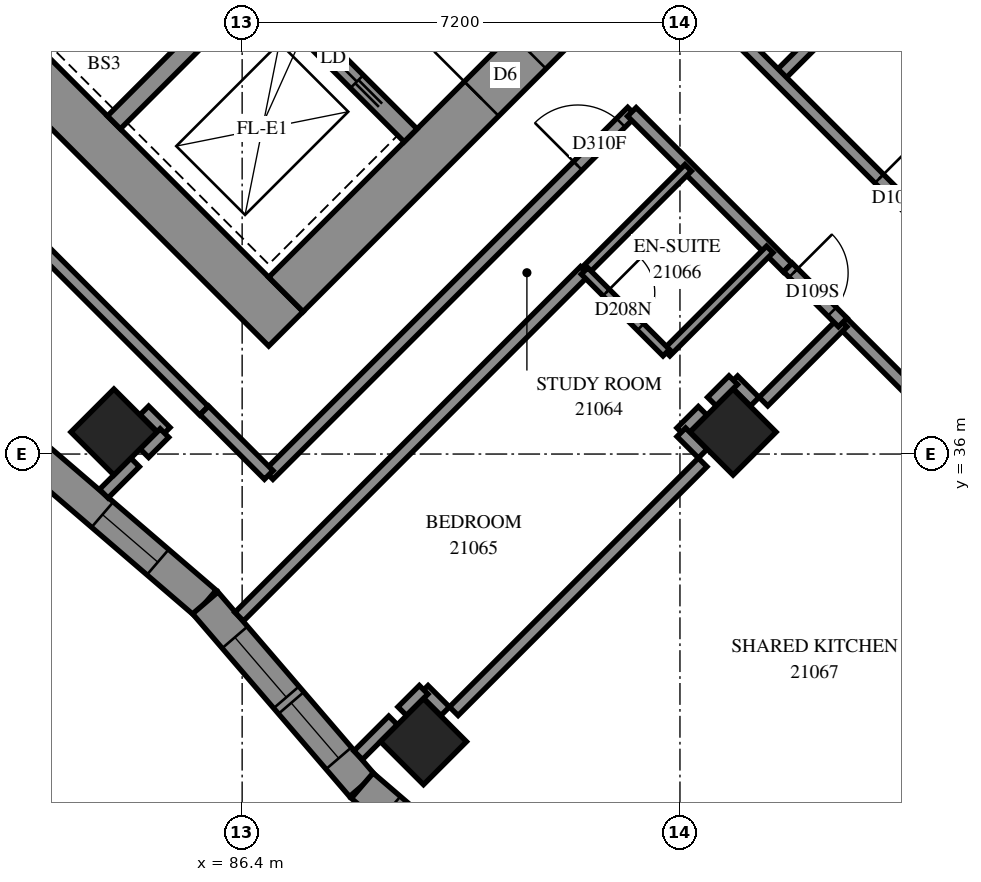
"""IFC4 building model, lengths in metres.
Left out: names, types, materials, properties, quantities, classifications, styles, units other than length and angle.
Written with IfcOpenShell. Run it as: python <this file> out.ifc"""

import sys

from ifc_helpers import new_model, si_unit, direction, frame, frame_2d, origin, origin_2d, place, context, subcontext, project, spatial, polyline, rectangle, outline, extrude, element, fill, save


model = new_model("IFC4")
c1 = context("Model", 3, precision=1e-05, world=origin(), true_north=direction((0.0, 1.0)))
c2 = subcontext(c1, "Body", "Model", "MODEL_VIEW")
j1 = project(units=[si_unit("LENGTHUNIT", "METRE"), si_unit("PLANEANGLEUNIT", "RADIAN")], contexts=[c1])
p1 = place(None, origin())
s1 = spatial("IfcSite", under=j1, at=p1, CompositionType="ELEMENT")
p2 = place(p1, origin())
s2 = spatial("IfcBuilding", under=s1, at=p2, CompositionType="ELEMENT")
p3 = place(p2, frame((0.0, 0.0, 81.2)))
s3 = spatial("IfcBuildingStorey", under=s2, at=p3, CompositionType="ELEMENT", Elevation=81.2)
for number, where, z_axis, x_axis in (
    (1, (84.291, 36.362, 0.0), (0.0, 0.0, 1.0), (0.707, -0.707, 0.0)),
    (2, (94.474, 36.362, 0.0), (0.0, 0.0, 1.0), (0.707, -0.707, 0.0)),
    (3, (89.382, 31.271, 0.0), (0.0, 0.0, 1.0), (0.707, -0.707, 0.0)),
):
    element("IfcColumn", number, at=place(p3, frame(where, z_axis=z_axis, x_axis=x_axis)), inside=s3, PredefinedType="COLUMN", context=c2, shape_type="SweptSolid", body=[
        extrude(rectangle(XDim=1.0, YDim=1.0, at=origin_2d()), origin(), (0.0, 0.0, 1.0), 3.1),
    ])
p4 = place(p3, frame((75.806, 49.373, -0.3), z_axis=(0.0, 0.0, 1.0), x_axis=(0.7071067812, -0.7071067812, 0.0)))
e4 = element("IfcWall", 4, at=p4, inside=s3, PredefinedType="SHEAR", context=c2, shape_type="SweptSolid", body=[
    extrude(rectangle(XDim=16.0, YDim=0.8, at=frame_2d((8.0, 0.0))), origin(), (0.0, 0.0, 1.0), 2.7),
])
p5 = place(p3, frame((87.12, 38.625, -0.3), z_axis=(0.0, 0.0, 1.0), x_axis=(0.7071067812, 0.7071067812, 0.0)))
e5 = element("IfcWall", 5, at=p5, inside=s3, PredefinedType="SHEAR", context=c2, shape_type="SweptSolid", body=[
    extrude(rectangle(XDim=14.4, YDim=0.8, at=frame_2d((7.2, 0.0))), origin(), (0.0, 0.0, 1.0), 2.7),
])
p6 = place(p5, frame((4.55, 0.0, 0.3)))
e6 = element("IfcOpeningElement", 6, at=p6, cuts=e5, PredefinedType="OPENING", context=c2, shape_type="SweptSolid", body=[
    extrude(rectangle(XDim=1.1, YDim=2.1, at=frame_2d((0.55, 1.05))), frame((0.0, 0.41, 0.0), z_axis=(0.0, -1.0, 0.0), x_axis=(1.0, 0.0, 0.0)), (0.0, 0.0, 1.0), 0.82),
])
p7 = place(p5, frame((11.35, 0.0, 0.3)))
e7 = element("IfcOpeningElement", 7, at=p7, cuts=e5, PredefinedType="OPENING", context=c2, shape_type="SweptSolid", body=[
    extrude(rectangle(XDim=1.1, YDim=2.1, at=frame_2d((0.55, 1.05))), frame((0.0, 0.41, 0.0), z_axis=(0.0, -1.0, 0.0), x_axis=(1.0, 0.0, 0.0)), (0.0, 0.0, 1.0), 0.82),
])
p8 = place(p3, frame((84.291, 41.453, 0.0), z_axis=(0.0, 0.0, 1.0), x_axis=(0.7071067812, 0.7071067812, 0.0)))
e8 = element("IfcWall", 8, at=p8, inside=s3, PredefinedType="SOLIDWALL", context=c2, shape_type="SweptSolid", body=[
    extrude(rectangle(XDim=3.3, YDim=0.3, at=frame_2d((1.65, 0.0))), origin(), (0.0, 0.0, 1.0), 3.1),
])
p9 = place(p3, frame((78.988, 51.423, 0.0), z_axis=(0.0, 0.0, 1.0), x_axis=(0.7071067812, -0.7071067812, 0.0)))
e9 = element("IfcWall", 9, at=p9, inside=s3, PredefinedType="SOLIDWALL", context=c2, shape_type="SweptSolid", body=[
    extrude(rectangle(XDim=14.4, YDim=0.3, at=frame_2d((7.2, 0.0))), origin(), (0.0, 0.0, 1.0), 3.1),
])
p10 = place(p9, frame((1.25, 0.0, 0.0)))
e10 = element("IfcOpeningElement", 10, at=p10, cuts=e9, PredefinedType="OPENING", context=c2, shape_type="SweptSolid", body=[
    extrude(rectangle(XDim=1.1, YDim=2.1, at=frame_2d((0.55, 1.05))), frame((0.0, 0.16, 0.0), z_axis=(0.0, -1.0, 0.0), x_axis=(1.0, 0.0, 0.0)), (0.0, 0.0, 1.0), 0.32),
])
p11 = place(p9, frame((4.85, 0.0, 0.0)))
e11 = element("IfcOpeningElement", 11, at=p11, cuts=e9, PredefinedType="OPENING", context=c2, shape_type="SweptSolid", body=[
    extrude(rectangle(XDim=1.1, YDim=2.1, at=frame_2d((0.55, 1.05))), frame((0.0, 0.16, 0.0), z_axis=(0.0, -1.0, 0.0), x_axis=(1.0, 0.0, 0.0)), (0.0, 0.0, 1.0), 0.32),
])
p12 = place(p9, frame((8.45, 0.0, 0.0)))
e12 = element("IfcOpeningElement", 12, at=p12, cuts=e9, PredefinedType="OPENING", context=c2, shape_type="SweptSolid", body=[
    extrude(rectangle(XDim=1.1, YDim=2.1, at=frame_2d((0.55, 1.05))), frame((0.0, 0.16, 0.0), z_axis=(0.0, -1.0, 0.0), x_axis=(1.0, 0.0, 0.0)), (0.0, 0.0, 1.0), 0.32),
])
p13 = place(p9, frame((12.05, 0.0, 0.0)))
e13 = element("IfcOpeningElement", 13, at=p13, cuts=e9, PredefinedType="OPENING", context=c2, shape_type="SweptSolid", body=[
    extrude(rectangle(XDim=1.1, YDim=2.1, at=frame_2d((0.55, 1.05))), frame((0.0, 0.16, 0.0), z_axis=(0.0, -1.0, 0.0), x_axis=(1.0, 0.0, 0.0)), (0.0, 0.0, 1.0), 0.32),
])
p14 = place(p3, frame((82.789, 36.133, 0.0), z_axis=(0.0, 0.0, 1.0), x_axis=(0.7586290345, -0.6515228223, 0.0)))
e14 = element("IfcWall", 14, at=p14, inside=s3, PredefinedType="SOLIDWALL", context=c2, shape_type="SweptSolid", body=[
    extrude(outline(polyline([(-0.021, -0.275), (3.941, -0.275), (3.982, 0.275), (0.021, 0.275), (-0.021, -0.275)])), origin(), (0.0, 0.0, 1.0), 3.1),
])
p15 = place(p14, frame((1.732, 0.0, 0.5)))
e15 = element("IfcOpeningElement", 15, at=p15, cuts=e14, PredefinedType="OPENING", context=c2, shape_type="SweptSolid", body=[
    extrude(rectangle(XDim=1.2, YDim=2.45, at=frame_2d((0.6, 1.225))), frame((0.0, 0.285, 0.0), z_axis=(0.0, -1.0, 0.0), x_axis=(1.0, 0.0, 0.0)), (0.0, 0.0, 1.0), 0.57),
])
p16 = place(p3, frame((85.794, 33.552, 0.0), z_axis=(0.0, 0.0, 1.0), x_axis=(0.6515228223, -0.7586290345, 0.0)))
e16 = element("IfcWall", 16, at=p16, inside=s3, PredefinedType="SOLIDWALL", context=c2, shape_type="SweptSolid", body=[
    extrude(outline(polyline([(0.021, -0.275), (3.982, -0.275), (3.941, 0.275), (-0.021, 0.275), (0.021, -0.275)])), origin(), (0.0, 0.0, 1.0), 3.1),
])
p17 = place(p16, frame((0.746, 0.0, 0.5)))
e17 = element("IfcOpeningElement", 17, at=p17, cuts=e16, PredefinedType="OPENING", context=c2, shape_type="SweptSolid", body=[
    extrude(rectangle(XDim=1.3, YDim=2.45, at=frame_2d((0.65, 1.225))), frame((0.0, 0.285, 0.0), z_axis=(0.0, -1.0, 0.0), x_axis=(1.0, 0.0, 0.0)), (0.0, 0.0, 1.0), 0.57),
])
p18 = place(p16, frame((2.168, 0.0, 0.5)))
e18 = element("IfcOpeningElement", 18, at=p18, cuts=e16, PredefinedType="OPENING", context=c2, shape_type="SweptSolid", body=[
    extrude(rectangle(XDim=1.2, YDim=2.45, at=frame_2d((0.6, 1.225))), frame((0.0, 0.285, 0.0), z_axis=(0.0, -1.0, 0.0), x_axis=(1.0, 0.0, 0.0)), (0.0, 0.0, 1.0), 0.57),
])
p19 = place(p3, frame((88.375, 30.547, 0.0), z_axis=(0.0, 0.0, 1.0), x_axis=(0.7586290345, -0.6515228223, 0.0)))
e19 = element("IfcWall", 19, at=p19, inside=s3, PredefinedType="SOLIDWALL", context=c2, shape_type="SweptSolid", body=[
    extrude(outline(polyline([(-0.021, -0.275), (3.941, -0.275), (3.982, 0.275), (0.021, 0.275), (-0.021, -0.275)])), origin(), (0.0, 0.0, 1.0), 3.1),
])
p20 = place(p19, frame((0.591, 0.0, 0.5)))
e20 = element("IfcOpeningElement", 20, at=p20, cuts=e19, PredefinedType="OPENING", context=c2, shape_type="SweptSolid", body=[
    extrude(rectangle(XDim=1.3, YDim=2.45, at=frame_2d((0.65, 1.225))), frame((0.0, 0.285, 0.0), z_axis=(0.0, -1.0, 0.0), x_axis=(1.0, 0.0, 0.0)), (0.0, 0.0, 1.0), 0.57),
])
p21 = place(p19, frame((2.091, 0.0, 0.5)))
e21 = element("IfcOpeningElement", 21, at=p21, cuts=e19, PredefinedType="OPENING", context=c2, shape_type="SweptSolid", body=[
    extrude(rectangle(XDim=1.3, YDim=2.45, at=frame_2d((0.65, 1.225))), frame((0.0, 0.285, 0.0), z_axis=(0.0, -1.0, 0.0), x_axis=(1.0, 0.0, 0.0)), (0.0, 0.0, 1.0), 0.57),
])
p22 = place(p3, frame((95.215, 42.197, 0.0), z_axis=(0.0, 0.0, 1.0), x_axis=(0.7071114855, 0.7071020769, 0.0)))
e22 = element("IfcWall", 22, at=p22, inside=s3, PredefinedType="PARTITIONING", context=c2, shape_type="SweptSolid", body=[
    extrude(rectangle(XDim=10.629, YDim=0.2, at=frame_2d((5.314, 0.0))), origin(), (0.0, 0.0, 1.0), 3.1),
])
p23 = place(p3, frame((94.294, 43.111, 0.0), z_axis=(0.0, 0.0, 1.0), x_axis=(0.7071067812, -0.7071067812, 0.0)))
e23 = element("IfcWall", 23, at=p23, inside=s3, PredefinedType="PARTITIONING", context=c2, shape_type="SweptSolid", body=[
    extrude(rectangle(XDim=8.499, YDim=0.2, at=frame_2d((4.25, 0.0))), origin(), (0.0, 0.0, 1.0), 3.1),
])
p24 = place(p23, frame((3.651, 0.0, 0.0)))
e24 = element("IfcOpeningElement", 24, at=p24, cuts=e23, PredefinedType="OPENING", context=c2, shape_type="SweptSolid", body=[
    extrude(rectangle(XDim=0.9, YDim=2.1, at=frame_2d((0.45, 1.05))), frame((0.0, 0.11, 0.0), z_axis=(0.0, -1.0, 0.0), x_axis=(1.0, 0.0, 0.0)), (0.0, 0.0, 1.0), 0.22),
])
p25 = place(p3, frame((86.835, 35.655, 0.0), z_axis=(0.0, 0.0, 1.0), x_axis=(0.7071067812, 0.7071067812, 0.0)))
e25 = element("IfcWall", 25, at=p25, inside=s3, PredefinedType="PARTITIONING", context=c2, shape_type="SweptSolid", body=[
    extrude(rectangle(XDim=8.451, YDim=0.2, at=frame_2d((4.226, 0.0))), origin(), (0.0, 0.0, 1.0), 3.1),
])
p26 = place(p25, frame((7.192, 0.0, 0.0)))
e26 = element("IfcOpeningElement", 26, at=p26, cuts=e25, PredefinedType="OPENING", context=c2, shape_type="SweptSolid", body=[
    extrude(rectangle(XDim=1.0, YDim=2.1, at=frame_2d((0.5, 1.05))), frame((0.0, 0.11, 0.0), z_axis=(0.0, -1.0, 0.0), x_axis=(1.0, 0.0, 0.0)), (0.0, 0.0, 1.0), 0.22),
])
p27 = place(p3, frame((86.351, 33.325, 0.0), z_axis=(0.0, 0.0, 1.0), x_axis=(0.7069824066, 0.7072311339, 0.0)))
e27 = element("IfcWall", 27, at=p27, inside=s3, PredefinedType="PARTITIONING", context=c2, shape_type="SweptSolid", body=[
    extrude(rectangle(XDim=8.041, YDim=0.2, at=frame_2d((4.021, 0.0))), origin(), (0.0, 0.0, 1.0), 3.1),
])
p28 = place(p3, frame((80.948, 41.536, 0.0), z_axis=(0.0, 0.0, 1.0), x_axis=(0.7071067812, -0.7071067812, 0.0)))
e28 = element("IfcWall", 28, at=p28, inside=s3, PredefinedType="PARTITIONING", context=c2, shape_type="SweptSolid", body=[
    extrude(rectangle(XDim=6.822, YDim=0.2, at=frame_2d((3.411, 0.0))), origin(), (0.0, 0.0, 1.0), 3.1),
])
p29 = place(p3, frame((89.881, 31.771, 0.0), z_axis=(0.0, 0.0, 1.0), x_axis=(0.7071067812, 0.7071067812, 0.0)))
e29 = element("IfcWall", 29, at=p29, inside=s3, PredefinedType="PARTITIONING", context=c2, shape_type="SweptSolid", body=[
    extrude(rectangle(XDim=5.787, YDim=0.2, at=frame_2d((2.893, 0.0))), origin(), (0.0, 0.0, 1.0), 3.1),
])
p30 = place(p3, frame((94.973, 26.681, 0.0), z_axis=(0.0, 0.0, 1.0), x_axis=(0.7071067812, 0.7071067812, 0.0)))
e30 = element("IfcWall", 30, at=p30, inside=s3, PredefinedType="PARTITIONING", context=c2, shape_type="SweptSolid", body=[
    extrude(rectangle(XDim=5.784, YDim=0.2, at=frame_2d((2.892, 0.0))), origin(), (0.0, 0.0, 1.0), 3.1),
])
p31 = place(p3, frame((92.809, 41.627, 0.0), z_axis=(0.0, 0.0, 1.0), x_axis=(0.7071067812, -0.7071067812, 0.0)))
e31 = element("IfcWall", 31, at=p31, inside=s3, PredefinedType="PARTITIONING", context=c2, shape_type="SweptSolid", body=[
    extrude(rectangle(XDim=3.623, YDim=0.2, at=frame_2d((1.812, 0.0))), origin(), (0.0, 0.0, 1.0), 3.1),
])
p32 = place(p3, frame((96.274, 38.162, 0.0), z_axis=(0.0, 0.0, 1.0), x_axis=(0.7071067812, -0.7071067812, 0.0)))
e32 = element("IfcWall", 32, at=p32, inside=s3, PredefinedType="PARTITIONING", context=c2, shape_type="SweptSolid", body=[
    extrude(rectangle(XDim=3.1, YDim=0.2, at=frame_2d((1.55, 0.0))), origin(), (0.0, 0.0, 1.0), 3.1),
])
for number, where, z_axis, x_axis in (
    (33, (92.037, 39.011, 0.0), (0.0, 0.0, 1.0), (0.708, 0.707, 0.0)),
    (34, (93.381, 37.667, 0.0), (0.0, 0.0, 1.0), (0.707, 0.708, 0.0)),
):
    element("IfcWall", number, at=place(p3, frame(where, z_axis=z_axis, x_axis=x_axis)), inside=s3, PredefinedType="PARTITIONING", context=c2, shape_type="SweptSolid", body=[
        extrude(rectangle(XDim=2.4, YDim=0.15, at=frame_2d((1.2, 0.0))), origin(), (0.0, 0.0, 1.0), 3.1),
    ])
p33 = place(p3, frame((92.031, 39.011, 0.0), z_axis=(0.0, 0.0, 1.0), x_axis=(0.7071067812, -0.7071067812, 0.0)))
e35 = element("IfcWall", 35, at=p33, inside=s3, PredefinedType="PARTITIONING", context=c2, shape_type="SweptSolid", body=[
    extrude(rectangle(XDim=1.901, YDim=0.15, at=frame_2d((0.95, 0.0))), origin(), (0.0, 0.0, 1.0), 3.1),
])
p34 = place(p33, frame((0.502, 0.0, 0.0)))
e36 = element("IfcOpeningElement", 36, at=p34, cuts=e35, PredefinedType="OPENING", context=c2, shape_type="SweptSolid", body=[
    extrude(rectangle(XDim=0.8, YDim=2.1, at=frame_2d((0.4, 1.05))), frame((0.0, 0.085, 0.0), z_axis=(0.0, -1.0, 0.0), x_axis=(1.0, 0.0, 0.0)), (0.0, 0.0, 1.0), 0.17),
])
p35 = place(p3, frame((94.973, 36.863, 0.0), z_axis=(0.0, 0.0, 1.0), x_axis=(0.7071067812, 0.7071067812, 0.0)))
e37 = element("IfcWall", 37, at=p35, inside=s3, PredefinedType="PARTITIONING", context=c2, shape_type="SweptSolid", body=[
    extrude(rectangle(XDim=1.841, YDim=0.2, at=frame_2d((0.921, 0.0))), origin(), (0.0, 0.0, 1.0), 3.1),
])
p36 = place(p3, frame((85.778, 36.718, 0.0), z_axis=(0.0, 0.0, 1.0), x_axis=(0.7064400143, -0.70777292, 0.0)))
e38 = element("IfcWall", 38, at=p36, inside=s3, PredefinedType="PARTITIONING", context=c2, shape_type="SweptSolid", body=[
    extrude(rectangle(XDim=1.5, YDim=0.2, at=frame_2d((0.75, 0.0))), origin(), (0.0, 0.0, 1.0), 3.1),
])
p37 = place(p3, frame((95.375, 39.069, 0.0), z_axis=(0.0, 0.0, 1.0), x_axis=(0.7063232841, -0.7078894111, 0.0)))
e39 = element("IfcWall", 39, at=p37, inside=s3, PredefinedType="PARTITIONING", context=c2, shape_type="SweptSolid", body=[
    extrude(rectangle(XDim=1.277, YDim=0.2, at=frame_2d((0.638, 0.0))), origin(), (0.0, 0.0, 1.0), 3.1),
])
p38 = place(p37, frame((0.129, 0.0, 0.0)))
e40 = element("IfcOpeningElement", 40, at=p38, cuts=e39, PredefinedType="OPENING", context=c2, shape_type="SweptSolid", body=[
    extrude(rectangle(XDim=0.9, YDim=2.1, at=frame_2d((0.45, 1.05))), frame((0.0, 0.11, 0.0), z_axis=(0.0, -1.0, 0.0), x_axis=(1.0, 0.0, 0.0)), (0.0, 0.0, 1.0), 0.22),
])
p39 = place(p3, frame((88.308, 31.047, 0.0), z_axis=(0.0, 0.0, 1.0), x_axis=(0.7071684107, 0.7070451463, 0.0)))
e41 = element("IfcWall", 41, at=p39, inside=s3, PredefinedType="PARTITIONING", context=c2, shape_type="SweptSolid", body=[
    extrude(rectangle(XDim=0.811, YDim=0.2, at=frame_2d((0.406, 0.0))), origin(), (0.0, 0.0, 1.0), 3.1),
])
p40 = place(p3, frame((84.124, 35.348, 0.0), z_axis=(0.0, 0.0, 1.0), x_axis=(0.7071067812, 0.7071067812, 0.0)))
e42 = element("IfcWall", 42, at=p40, inside=s3, PredefinedType="PARTITIONING", context=c2, shape_type="SweptSolid", body=[
    extrude(rectangle(XDim=0.728, YDim=0.2, at=frame_2d((0.364, 0.0))), origin(), (0.0, 0.0, 1.0), 3.1),
])
for number, where, z_axis, x_axis in (
    (43, (84.792, 36.718, 0.0), (0.0, 0.0, 1.0), (0.707, -0.707, 0.0)),
    (44, (93.621, 36.359, 0.0), (0.0, 0.0, 1.0), (0.707, 0.707, 0.0)),
    (45, (89.387, 32.123, 0.0), (0.0, 0.0, 1.0), (0.707, -0.707, 0.0)),
):
    element("IfcWall", number, at=place(p3, frame(where, z_axis=z_axis, x_axis=x_axis)), inside=s3, PredefinedType="PARTITIONING", context=c2, shape_type="SweptSolid", body=[
        extrude(rectangle(XDim=0.498, YDim=0.2, at=frame_2d((0.249, 0.0))), origin(), (0.0, 0.0, 1.0), 3.1),
    ])
p41 = place(p3, frame((84.791, 36.015, 0.0), z_axis=(0.0, 0.0, 1.0), x_axis=(0.7071067812, 0.7071067812, 0.0)))
e46 = element("IfcWall", 46, at=p41, inside=s3, PredefinedType="PARTITIONING", context=c2, shape_type="SweptSolid", body=[
    extrude(rectangle(XDim=0.468, YDim=0.2, at=frame_2d((0.234, 0.0))), origin(), (0.0, 0.0, 1.0), 3.1),
])
for number, where, z_axis, x_axis in (
    (47, (94.478, 37.214, 0.0), (0.0, 0.0, 1.0), (0.707, -0.707, 0.0)),
    (48, (89.033, 31.771, 0.0), (0.0, 0.0, 1.0), (0.707, 0.707, 0.0)),
    (49, (94.125, 36.863, 0.0), (0.0, 0.0, 1.0), (0.707, 0.707, 0.0)),
    (50, (93.622, 36.358, 0.0), (0.0, 0.0, 1.0), (0.707, -0.707, 0.0)),
):
    element("IfcWall", number, at=place(p3, frame(where, z_axis=z_axis, x_axis=x_axis)), inside=s3, PredefinedType="PARTITIONING", context=c2, shape_type="SweptSolid", body=[
        extrude(rectangle(XDim=0.498, YDim=0.2, at=frame_2d((0.249, 0.0))), origin(), (0.0, 0.0, 1.0), 3.1),
    ])
p42 = place(p15, origin())
e51 = element("IfcWindow", 51, at=p42, inside=s3, PartitioningType="SINGLE_PANEL", PredefinedType="WINDOW", context=c2, shape_type="SweptSolid", body=[
    extrude(rectangle(XDim=1.2, YDim=2.45, at=frame_2d((0.6, 1.225))), frame((0.0, 0.155, 0.0), z_axis=(0.0, -1.0, 0.0), x_axis=(1.0, 0.0, 0.0)), (0.0, 0.0, 1.0), 0.06),
])
fill(e15, e51)
p43 = place(p17, origin())
e52 = element("IfcWindow", 52, at=p43, inside=s3, PartitioningType="SINGLE_PANEL", PredefinedType="WINDOW", context=c2, shape_type="SweptSolid", body=[
    extrude(rectangle(XDim=1.3, YDim=2.45, at=frame_2d((0.65, 1.225))), frame((0.0, 0.155, 0.0), z_axis=(0.0, -1.0, 0.0), x_axis=(1.0, 0.0, 0.0)), (0.0, 0.0, 1.0), 0.06),
])
fill(e17, e52)
p44 = place(p20, origin())
e53 = element("IfcWindow", 53, at=p44, inside=s3, PartitioningType="SINGLE_PANEL", PredefinedType="WINDOW", context=c2, shape_type="SweptSolid", body=[
    extrude(rectangle(XDim=1.3, YDim=2.45, at=frame_2d((0.65, 1.225))), frame((0.0, 0.155, 0.0), z_axis=(0.0, -1.0, 0.0), x_axis=(1.0, 0.0, 0.0)), (0.0, 0.0, 1.0), 0.06),
])
fill(e20, e53)
p45 = place(p6, origin())
e54 = element("IfcDoor", 54, at=p45, inside=s3, OperationType="DOUBLE_DOOR_SINGLE_SWING", PredefinedType="DOOR", context=c2, shape_type="SweptSolid", body=[
    extrude(rectangle(XDim=1.1, YDim=2.1, at=frame_2d((0.55, 1.05))), frame((0.0, 0.025, 0.0), z_axis=(0.0, -1.0, 0.0), x_axis=(1.0, 0.0, 0.0)), (0.0, 0.0, 1.0), 0.05),
])
fill(e6, e54)
p46 = place(p13, origin())
e55 = element("IfcDoor", 55, at=p46, inside=s3, OperationType="SLIDING_TO_RIGHT", PredefinedType="DOOR", context=c2, shape_type="SweptSolid", body=[
    extrude(rectangle(XDim=1.1, YDim=2.1, at=frame_2d((0.55, 1.05))), frame((0.0, 0.025, 0.0), z_axis=(0.0, -1.0, 0.0), x_axis=(1.0, 0.0, 0.0)), (0.0, 0.0, 1.0), 0.05),
])
fill(e13, e55)
p47 = place(p24, origin())
e56 = element("IfcDoor", 56, at=p47, inside=s3, OperationType="SINGLE_SWING_RIGHT", PredefinedType="DOOR", context=c2, shape_type="SweptSolid", body=[
    extrude(rectangle(XDim=0.9, YDim=2.1, at=frame_2d((0.45, 1.05))), frame((0.0, 0.025, 0.0), z_axis=(0.0, -1.0, 0.0), x_axis=(1.0, 0.0, 0.0)), (0.0, 0.0, 1.0), 0.05),
])
fill(e24, e56)
p48 = place(p26, origin())
e57 = element("IfcDoor", 57, at=p48, inside=s3, OperationType="SINGLE_SWING_RIGHT", PredefinedType="DOOR", context=c2, shape_type="SweptSolid", body=[
    extrude(rectangle(XDim=1.0, YDim=2.1, at=frame_2d((0.5, 1.05))), frame((0.0, 0.025, 0.0), z_axis=(0.0, -1.0, 0.0), x_axis=(1.0, 0.0, 0.0)), (0.0, 0.0, 1.0), 0.05),
])
fill(e26, e57)
p49 = place(p38, origin())
e58 = element("IfcDoor", 58, at=p49, inside=s3, OperationType="SINGLE_SWING_LEFT", PredefinedType="DOOR", context=c2, shape_type="SweptSolid", body=[
    extrude(rectangle(XDim=0.9, YDim=2.1, at=frame_2d((0.45, 1.05))), frame((0.0, 0.025, 0.0), z_axis=(0.0, -1.0, 0.0), x_axis=(1.0, 0.0, 0.0)), (0.0, 0.0, 1.0), 0.05),
])
fill(e40, e58)
p50 = place(p34, origin())
e59 = element("IfcDoor", 59, at=p50, inside=s3, OperationType="SINGLE_SWING_RIGHT", PredefinedType="DOOR", context=c2, shape_type="SweptSolid", body=[
    extrude(rectangle(XDim=0.8, YDim=2.1, at=frame_2d((0.4, 1.05))), frame((0.0, 0.025, 0.0), z_axis=(0.0, -1.0, 0.0), x_axis=(1.0, 0.0, 0.0)), (0.0, 0.0, 1.0), 0.05),
])
fill(e36, e59)
p51 = place(p18, origin())
e60 = element("IfcWindow", 60, at=p51, inside=s3, PartitioningType="SINGLE_PANEL", PredefinedType="WINDOW", context=c2, shape_type="SweptSolid", body=[
    extrude(rectangle(XDim=1.2, YDim=2.45, at=frame_2d((0.6, 1.225))), frame((0.0, 0.155, 0.0), z_axis=(0.0, -1.0, 0.0), x_axis=(1.0, 0.0, 0.0)), (0.0, 0.0, 1.0), 0.06),
])
fill(e18, e60)
save(model, sys.argv[1])
